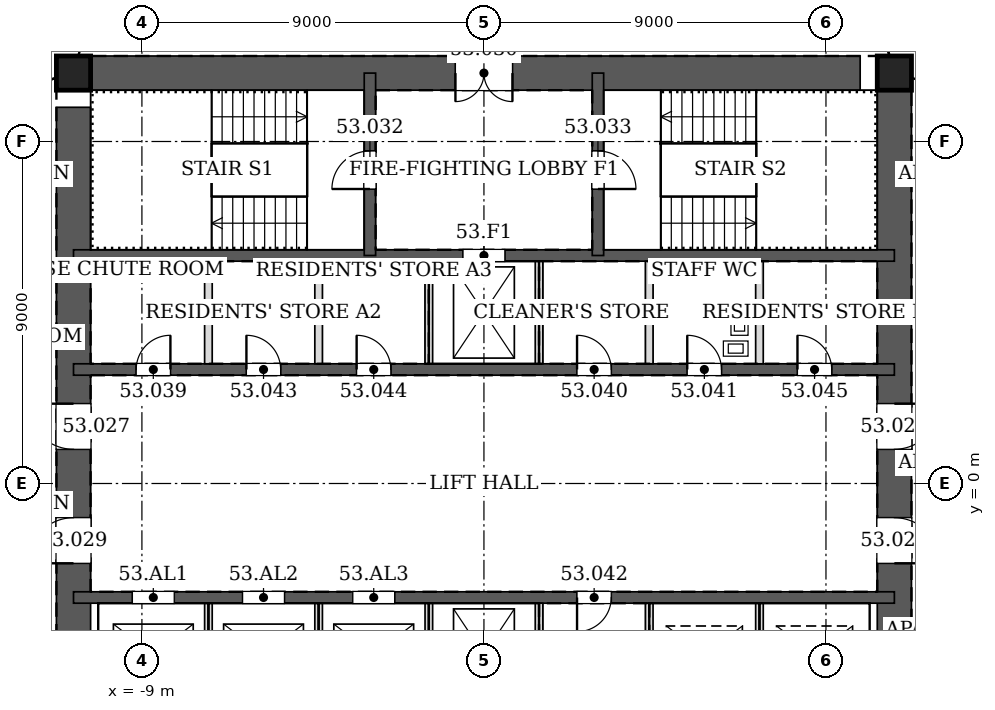
"""IFC4 building model, lengths in metres.
Left out: names, types, materials, properties, quantities, classifications, styles, units other than length and angle.
Written with IfcOpenShell. Run it as: python <this file> out.ifc"""

import sys

from ifc_helpers import new_model, si_unit, direction, frame, frame_2d, origin, origin_2d, place, context, subcontext, project, spatial, rectangle, hollow_rectangle, extrude, element, fill, save


model = new_model("IFC4")
c1 = context("Model", 3, precision=1e-05, world=origin(), true_north=direction((0.0, 1.0)))
c2 = subcontext(c1, "Body", "Model", "MODEL_VIEW")
j1 = project(units=[si_unit("LENGTHUNIT", "METRE"), si_unit("PLANEANGLEUNIT", "RADIAN")], contexts=[c1])
p1 = place(None, origin())
s1 = spatial("IfcSite", under=j1, at=p1, CompositionType="ELEMENT")
p2 = place(p1, origin())
s2 = spatial("IfcBuilding", under=s1, at=p2, CompositionType="ELEMENT")
p3 = place(p2, frame((0.0, 0.0, 227.8)))
s3 = spatial("IfcBuildingStorey", under=s2, at=p3, CompositionType="ELEMENT", Elevation=227.8)
for number, where, z_axis, x_axis in (
    (1, (10.8, 10.8, 0.0), (0.0, 0.0, 1.0), (1.0, 0.0, 0.0)),
    (2, (-10.8, 10.8, 0.0), (0.0, 0.0, 1.0), (1.0, 0.0, 0.0)),
):
    element("IfcColumn", number, at=place(p3, frame(where, z_axis=z_axis, x_axis=x_axis)), inside=s3, PredefinedType="COLUMN", context=c2, shape_type="SweptSolid", body=[
        extrude(hollow_rectangle(XDim=0.9, YDim=0.9, WallThickness=0.05, at=origin_2d()), origin(), (0.0, 0.0, 1.0), 3.4),
    ])
p4 = place(p3, frame((10.8, -10.8, 0.0), z_axis=(0.0, 0.0, 1.0), x_axis=(0.0, 1.0, 0.0)))
e3 = element("IfcWall", 3, at=p4, inside=s3, PredefinedType="SOLIDWALL", context=c2, shape_type="SweptSolid", body=[
    extrude(rectangle(XDim=21.6, YDim=0.9, at=frame_2d((10.8, 0.0))), origin(), (0.0, 0.0, 1.0), 3.4),
])
p5 = place(p4, frame((11.7, 0.0, 0.0)))
e4 = element("IfcOpeningElement", 4, at=p5, cuts=e3, PredefinedType="OPENING", context=c2, shape_type="SweptSolid", body=[
    extrude(rectangle(XDim=1.2, YDim=2.1, at=frame_2d((0.6, 1.05))), frame((0.0, 0.46, 0.0), z_axis=(0.0, -1.0, 0.0), x_axis=(1.0, 0.0, 0.0)), (0.0, 0.0, 1.0), 0.92),
])
p6 = place(p4, frame((8.7, 0.0, 0.0)))
e5 = element("IfcOpeningElement", 5, at=p6, cuts=e3, PredefinedType="OPENING", context=c2, shape_type="SweptSolid", body=[
    extrude(rectangle(XDim=1.2, YDim=2.1, at=frame_2d((0.6, 1.05))), frame((0.0, 0.46, 0.0), z_axis=(0.0, -1.0, 0.0), x_axis=(1.0, 0.0, 0.0)), (0.0, 0.0, 1.0), 0.92),
])
p7 = place(p3, frame((10.8, 10.8, 0.0), z_axis=(0.0, 0.0, 1.0), x_axis=(-1.0, 0.0, 0.0)))
e6 = element("IfcWall", 6, at=p7, inside=s3, PredefinedType="SOLIDWALL", context=c2, shape_type="SweptSolid", body=[
    extrude(rectangle(XDim=21.6, YDim=0.9, at=frame_2d((10.8, 0.0))), origin(), (0.0, 0.0, 1.0), 3.4),
])
p8 = place(p7, frame((10.05, 0.0, 0.0)))
e7 = element("IfcOpeningElement", 7, at=p8, cuts=e6, PredefinedType="OPENING", context=c2, shape_type="SweptSolid", body=[
    extrude(rectangle(XDim=1.5, YDim=2.1, at=frame_2d((0.75, 1.05))), frame((0.0, 0.46, 0.0), z_axis=(0.0, -1.0, 0.0), x_axis=(1.0, 0.0, 0.0)), (0.0, 0.0, 1.0), 0.92),
])
p9 = place(p3, frame((-10.8, 10.8, 0.0), z_axis=(0.0, 0.0, 1.0), x_axis=(0.0, -1.0, 0.0)))
e8 = element("IfcWall", 8, at=p9, inside=s3, PredefinedType="SOLIDWALL", context=c2, shape_type="SweptSolid", body=[
    extrude(rectangle(XDim=21.6, YDim=0.9, at=frame_2d((10.8, 0.0))), origin(), (0.0, 0.0, 1.0), 3.4),
])
p10 = place(p9, frame((8.7, 0.0, 0.0)))
e9 = element("IfcOpeningElement", 9, at=p10, cuts=e8, PredefinedType="OPENING", context=c2, shape_type="SweptSolid", body=[
    extrude(rectangle(XDim=1.2, YDim=2.1, at=frame_2d((0.6, 1.05))), frame((0.0, 0.46, 0.0), z_axis=(0.0, -1.0, 0.0), x_axis=(1.0, 0.0, 0.0)), (0.0, 0.0, 1.0), 0.92),
])
p11 = place(p9, frame((11.7, 0.0, 0.0)))
e10 = element("IfcOpeningElement", 10, at=p11, cuts=e8, PredefinedType="OPENING", context=c2, shape_type="SweptSolid", body=[
    extrude(rectangle(XDim=1.2, YDim=2.1, at=frame_2d((0.6, 1.05))), frame((0.0, 0.46, 0.0), z_axis=(0.0, -1.0, 0.0), x_axis=(1.0, 0.0, 0.0)), (0.0, 0.0, 1.0), 0.92),
])
p12 = place(p3, frame((-10.8, 3.0, 0.0), z_axis=(0.0, 0.0, 1.0), x_axis=(1.0, 0.0, 0.0)))
e11 = element("IfcWall", 11, at=p12, inside=s3, PredefinedType="SOLIDWALL", context=c2, shape_type="SweptSolid", body=[
    extrude(rectangle(XDim=21.6, YDim=0.3, at=frame_2d((10.8, 0.0))), origin(), (0.0, 0.0, 1.0), 3.4),
])
p13 = place(p12, frame((1.65, 0.0, 0.0)))
e12 = element("IfcOpeningElement", 12, at=p13, cuts=e11, PredefinedType="OPENING", context=c2, shape_type="SweptSolid", body=[
    extrude(rectangle(XDim=0.9, YDim=2.1, at=frame_2d((0.45, 1.05))), frame((0.0, 0.16, 0.0), z_axis=(0.0, -1.0, 0.0), x_axis=(1.0, 0.0, 0.0)), (0.0, 0.0, 1.0), 0.32),
])
p14 = place(p12, frame((13.25, 0.0, 0.0)))
e13 = element("IfcOpeningElement", 13, at=p14, cuts=e11, PredefinedType="OPENING", context=c2, shape_type="SweptSolid", body=[
    extrude(rectangle(XDim=0.9, YDim=2.1, at=frame_2d((0.45, 1.05))), frame((0.0, 0.16, 0.0), z_axis=(0.0, -1.0, 0.0), x_axis=(1.0, 0.0, 0.0)), (0.0, 0.0, 1.0), 0.32),
])
p15 = place(p12, frame((16.15, 0.0, 0.0)))
e14 = element("IfcOpeningElement", 14, at=p15, cuts=e11, PredefinedType="OPENING", context=c2, shape_type="SweptSolid", body=[
    extrude(rectangle(XDim=0.9, YDim=2.1, at=frame_2d((0.45, 1.05))), frame((0.0, 0.16, 0.0), z_axis=(0.0, -1.0, 0.0), x_axis=(1.0, 0.0, 0.0)), (0.0, 0.0, 1.0), 0.32),
])
p16 = place(p12, frame((4.55, 0.0, 0.0)))
e15 = element("IfcOpeningElement", 15, at=p16, cuts=e11, PredefinedType="OPENING", context=c2, shape_type="SweptSolid", body=[
    extrude(rectangle(XDim=0.9, YDim=2.1, at=frame_2d((0.45, 1.05))), frame((0.0, 0.16, 0.0), z_axis=(0.0, -1.0, 0.0), x_axis=(1.0, 0.0, 0.0)), (0.0, 0.0, 1.0), 0.32),
])
p17 = place(p12, frame((7.45, 0.0, 0.0)))
e16 = element("IfcOpeningElement", 16, at=p17, cuts=e11, PredefinedType="OPENING", context=c2, shape_type="SweptSolid", body=[
    extrude(rectangle(XDim=0.9, YDim=2.1, at=frame_2d((0.45, 1.05))), frame((0.0, 0.16, 0.0), z_axis=(0.0, -1.0, 0.0), x_axis=(1.0, 0.0, 0.0)), (0.0, 0.0, 1.0), 0.32),
])
p18 = place(p12, frame((19.05, 0.0, 0.0)))
e17 = element("IfcOpeningElement", 17, at=p18, cuts=e11, PredefinedType="OPENING", context=c2, shape_type="SweptSolid", body=[
    extrude(rectangle(XDim=0.9, YDim=2.1, at=frame_2d((0.45, 1.05))), frame((0.0, 0.16, 0.0), z_axis=(0.0, -1.0, 0.0), x_axis=(1.0, 0.0, 0.0)), (0.0, 0.0, 1.0), 0.32),
])
p19 = place(p3, frame((-10.8, 6.0, 0.0), z_axis=(0.0, 0.0, 1.0), x_axis=(1.0, 0.0, 0.0)))
e18 = element("IfcWall", 18, at=p19, inside=s3, PredefinedType="SOLIDWALL", context=c2, shape_type="SweptSolid", body=[
    extrude(rectangle(XDim=21.6, YDim=0.3, at=frame_2d((10.8, 0.0))), origin(), (0.0, 0.0, 1.0), 3.4),
])
p20 = place(p19, frame((10.25, 0.0, 0.0)))
e19 = element("IfcOpeningElement", 19, at=p20, cuts=e18, PredefinedType="OPENING", context=c2, shape_type="SweptSolid", body=[
    extrude(rectangle(XDim=1.1, YDim=2.1, at=frame_2d((0.55, 1.05))), frame((0.0, 0.16, 0.0), z_axis=(0.0, -1.0, 0.0), x_axis=(1.0, 0.0, 0.0)), (0.0, 0.0, 1.0), 0.32),
])
p21 = place(p3, frame((-3.0, 6.0, 0.0), z_axis=(0.0, 0.0, 1.0), x_axis=(0.0, 1.0, 0.0)))
e20 = element("IfcWall", 20, at=p21, inside=s3, PredefinedType="SOLIDWALL", context=c2, shape_type="SweptSolid", body=[
    extrude(rectangle(XDim=4.8, YDim=0.3, at=frame_2d((2.4, 0.0))), origin(), (0.0, 0.0, 1.0), 3.4),
])
p22 = place(p21, frame((1.75, 0.0, 0.0)))
e21 = element("IfcOpeningElement", 21, at=p22, cuts=e20, PredefinedType="OPENING", context=c2, shape_type="SweptSolid", body=[
    extrude(rectangle(XDim=1.0, YDim=2.1, at=frame_2d((0.5, 1.05))), frame((0.0, 0.16, 0.0), z_axis=(0.0, -1.0, 0.0), x_axis=(1.0, 0.0, 0.0)), (0.0, 0.0, 1.0), 0.32),
])
p23 = place(p3, frame((3.0, 6.0, 0.0), z_axis=(0.0, 0.0, 1.0), x_axis=(0.0, 1.0, 0.0)))
e22 = element("IfcWall", 22, at=p23, inside=s3, PredefinedType="SOLIDWALL", context=c2, shape_type="SweptSolid", body=[
    extrude(rectangle(XDim=4.8, YDim=0.3, at=frame_2d((2.4, 0.0))), origin(), (0.0, 0.0, 1.0), 3.4),
])
p24 = place(p23, frame((1.75, 0.0, 0.0)))
e23 = element("IfcOpeningElement", 23, at=p24, cuts=e22, PredefinedType="OPENING", context=c2, shape_type="SweptSolid", body=[
    extrude(rectangle(XDim=1.0, YDim=2.1, at=frame_2d((0.5, 1.05))), frame((0.0, 0.16, 0.0), z_axis=(0.0, -1.0, 0.0), x_axis=(1.0, 0.0, 0.0)), (0.0, 0.0, 1.0), 0.32),
])
p25 = place(p3, frame((-10.8, -3.0, 0.0), z_axis=(0.0, 0.0, 1.0), x_axis=(1.0, 0.0, 0.0)))
e24 = element("IfcWall", 24, at=p25, inside=s3, PredefinedType="SOLIDWALL", context=c2, shape_type="SweptSolid", body=[
    extrude(rectangle(XDim=21.6, YDim=0.3, at=frame_2d((10.8, 0.0))), origin(), (0.0, 0.0, 1.0), 3.4),
])
p26 = place(p25, frame((13.25, 0.0, 0.0)))
e25 = element("IfcOpeningElement", 25, at=p26, cuts=e24, PredefinedType="OPENING", context=c2, shape_type="SweptSolid", body=[
    extrude(rectangle(XDim=0.9, YDim=2.1, at=frame_2d((0.45, 1.05))), frame((0.0, 0.16, 0.0), z_axis=(0.0, -1.0, 0.0), x_axis=(1.0, 0.0, 0.0)), (0.0, 0.0, 1.0), 0.32),
])
p27 = place(p25, frame((1.55, 0.0, 0.0)))
e26 = element("IfcOpeningElement", 26, at=p27, cuts=e24, PredefinedType="OPENING", context=c2, shape_type="SweptSolid", body=[
    extrude(rectangle(XDim=1.1, YDim=2.1, at=frame_2d((0.55, 1.05))), frame((0.0, 0.16, 0.0), z_axis=(0.0, -1.0, 0.0), x_axis=(1.0, 0.0, 0.0)), (0.0, 0.0, 1.0), 0.32),
])
p28 = place(p25, frame((4.45, 0.0, 0.0)))
e27 = element("IfcOpeningElement", 27, at=p28, cuts=e24, PredefinedType="OPENING", context=c2, shape_type="SweptSolid", body=[
    extrude(rectangle(XDim=1.1, YDim=2.1, at=frame_2d((0.55, 1.05))), frame((0.0, 0.16, 0.0), z_axis=(0.0, -1.0, 0.0), x_axis=(1.0, 0.0, 0.0)), (0.0, 0.0, 1.0), 0.32),
])
p29 = place(p25, frame((7.35, 0.0, 0.0)))
e28 = element("IfcOpeningElement", 28, at=p29, cuts=e24, PredefinedType="OPENING", context=c2, shape_type="SweptSolid", body=[
    extrude(rectangle(XDim=1.1, YDim=2.1, at=frame_2d((0.55, 1.05))), frame((0.0, 0.16, 0.0), z_axis=(0.0, -1.0, 0.0), x_axis=(1.0, 0.0, 0.0)), (0.0, 0.0, 1.0), 0.32),
])
for number, where, z_axis, x_axis in (
    (29, (-7.25, 3.15, 0.0), (0.0, 0.0, 1.0), (0.0, 1.0, 0.0)),
    (30, (-4.35, 3.15, 0.0), (0.0, 0.0, 1.0), (0.0, 1.0, 0.0)),
    (31, (-1.45, 3.15, 0.0), (0.0, 0.0, 1.0), (0.0, 1.0, 0.0)),
    (32, (1.45, 3.15, 0.0), (0.0, 0.0, 1.0), (0.0, 1.0, 0.0)),
    (33, (4.35, 3.15, 0.0), (0.0, 0.0, 1.0), (0.0, 1.0, 0.0)),
    (34, (7.25, 3.15, 0.0), (0.0, 0.0, 1.0), (0.0, 1.0, 0.0)),
):
    element("IfcWall", number, at=place(p3, frame(where, z_axis=z_axis, x_axis=x_axis)), inside=s3, PredefinedType="PARTITIONING", context=c2, shape_type="SweptSolid", body=[
        extrude(rectangle(XDim=2.7, YDim=0.2, at=frame_2d((1.35, 0.0))), origin(), (0.0, 0.0, 1.0), 3.2),
    ])
for number, where, z_axis, x_axis in (
    (35, (-7.25, -5.85, 0.0), (0.0, 0.0, 1.0), (0.0, 1.0, 0.0)),
    (36, (-4.35, -5.85, 0.0), (0.0, 0.0, 1.0), (0.0, 1.0, 0.0)),
    (37, (-1.45, -5.85, 0.0), (0.0, 0.0, 1.0), (0.0, 1.0, 0.0)),
):
    element("IfcWall", number, at=place(p3, frame(where, z_axis=z_axis, x_axis=x_axis)), inside=s3, PredefinedType="PARTITIONING", context=c2, shape_type="SweptSolid", body=[
        extrude(rectangle(XDim=2.7, YDim=0.2, at=frame_2d((1.35, 0.0))), origin(), (0.0, 0.0, 1.0), 3.4),
    ])
for number, where, z_axis, x_axis in (
    (38, (1.45, -5.85, 0.0), (0.0, 0.0, 1.0), (0.0, 1.0, 0.0)),
    (39, (4.35, -5.85, 0.0), (0.0, 0.0, 1.0), (0.0, 1.0, 0.0)),
):
    element("IfcWall", number, at=place(p3, frame(where, z_axis=z_axis, x_axis=x_axis)), inside=s3, PredefinedType="PARTITIONING", context=c2, shape_type="SweptSolid", body=[
        extrude(rectangle(XDim=2.7, YDim=0.2, at=frame_2d((1.35, 0.0))), origin(), (0.0, 0.0, 1.0), 3.2),
    ])
p30 = place(p3, frame((7.25, -5.85, 0.0), z_axis=(0.0, 0.0, 1.0), x_axis=(0.0, 1.0, 0.0)))
e40 = element("IfcWall", 40, at=p30, inside=s3, PredefinedType="PARTITIONING", context=c2, shape_type="SweptSolid", body=[
    extrude(rectangle(XDim=2.7, YDim=0.2, at=frame_2d((1.35, 0.0))), origin(), (0.0, 0.0, 1.0), 3.4),
])
p31 = place(p5, frame((1.2, 0.0, 0.0), z_axis=(0.0, 0.0, 1.0), x_axis=(-1.0, 0.0, 0.0)))
e41 = element("IfcDoor", 41, at=p31, inside=s3, OperationType="SINGLE_SWING_LEFT", PredefinedType="DOOR", context=c2, shape_type="SweptSolid", body=[
    extrude(rectangle(XDim=1.2, YDim=2.1, at=frame_2d((0.6, 1.05))), frame((0.0, 0.025, 0.0), z_axis=(0.0, -1.0, 0.0), x_axis=(1.0, 0.0, 0.0)), (0.0, 0.0, 1.0), 0.05),
])
fill(e4, e41)
p32 = place(p10, frame((1.2, 0.0, 0.0), z_axis=(0.0, 0.0, 1.0), x_axis=(-1.0, 0.0, 0.0)))
e42 = element("IfcDoor", 42, at=p32, inside=s3, OperationType="SINGLE_SWING_RIGHT", PredefinedType="DOOR", context=c2, shape_type="SweptSolid", body=[
    extrude(rectangle(XDim=1.2, YDim=2.1, at=frame_2d((0.6, 1.05))), frame((0.0, 0.025, 0.0), z_axis=(0.0, -1.0, 0.0), x_axis=(1.0, 0.0, 0.0)), (0.0, 0.0, 1.0), 0.05),
])
fill(e9, e42)
p33 = place(p6, frame((1.2, 0.0, 0.0), z_axis=(0.0, 0.0, 1.0), x_axis=(-1.0, 0.0, 0.0)))
e43 = element("IfcDoor", 43, at=p33, inside=s3, OperationType="SINGLE_SWING_RIGHT", PredefinedType="DOOR", context=c2, shape_type="SweptSolid", body=[
    extrude(rectangle(XDim=1.2, YDim=2.1, at=frame_2d((0.6, 1.05))), frame((0.0, 0.025, 0.0), z_axis=(0.0, -1.0, 0.0), x_axis=(1.0, 0.0, 0.0)), (0.0, 0.0, 1.0), 0.05),
])
fill(e5, e43)
p34 = place(p11, frame((1.2, 0.0, 0.0), z_axis=(0.0, 0.0, 1.0), x_axis=(-1.0, 0.0, 0.0)))
e44 = element("IfcDoor", 44, at=p34, inside=s3, OperationType="SINGLE_SWING_LEFT", PredefinedType="DOOR", context=c2, shape_type="SweptSolid", body=[
    extrude(rectangle(XDim=1.2, YDim=2.1, at=frame_2d((0.6, 1.05))), frame((0.0, 0.025, 0.0), z_axis=(0.0, -1.0, 0.0), x_axis=(1.0, 0.0, 0.0)), (0.0, 0.0, 1.0), 0.05),
])
fill(e10, e44)
p35 = place(p8, origin())
e45 = element("IfcDoor", 45, at=p35, inside=s3, OperationType="DOUBLE_DOOR_SINGLE_SWING", PredefinedType="DOOR", context=c2, shape_type="SweptSolid", body=[
    extrude(rectangle(XDim=1.5, YDim=2.1, at=frame_2d((0.75, 1.05))), frame((0.0, 0.025, 0.0), z_axis=(0.0, -1.0, 0.0), x_axis=(1.0, 0.0, 0.0)), (0.0, 0.0, 1.0), 0.05),
])
fill(e7, e45)
p36 = place(p22, origin())
e46 = element("IfcDoor", 46, at=p36, inside=s3, OperationType="SINGLE_SWING_LEFT", PredefinedType="DOOR", context=c2, shape_type="SweptSolid", body=[
    extrude(rectangle(XDim=1.0, YDim=2.1, at=frame_2d((0.5, 1.05))), frame((0.0, 0.025, 0.0), z_axis=(0.0, -1.0, 0.0), x_axis=(1.0, 0.0, 0.0)), (0.0, 0.0, 1.0), 0.05),
])
fill(e21, e46)
p37 = place(p24, frame((1.0, 0.0, 0.0), z_axis=(0.0, 0.0, 1.0), x_axis=(-1.0, 0.0, 0.0)))
e47 = element("IfcDoor", 47, at=p37, inside=s3, OperationType="SINGLE_SWING_RIGHT", PredefinedType="DOOR", context=c2, shape_type="SweptSolid", body=[
    extrude(rectangle(XDim=1.0, YDim=2.1, at=frame_2d((0.5, 1.05))), frame((0.0, 0.025, 0.0), z_axis=(0.0, -1.0, 0.0), x_axis=(1.0, 0.0, 0.0)), (0.0, 0.0, 1.0), 0.05),
])
fill(e23, e47)
p38 = place(p13, origin())
e48 = element("IfcDoor", 48, at=p38, inside=s3, OperationType="SINGLE_SWING_RIGHT", PredefinedType="DOOR", context=c2, shape_type="SweptSolid", body=[
    extrude(rectangle(XDim=0.9, YDim=2.1, at=frame_2d((0.45, 1.05))), frame((0.0, 0.025, 0.0), z_axis=(0.0, -1.0, 0.0), x_axis=(1.0, 0.0, 0.0)), (0.0, 0.0, 1.0), 0.05),
])
fill(e12, e48)
p39 = place(p14, origin())
e49 = element("IfcDoor", 49, at=p39, inside=s3, OperationType="SINGLE_SWING_LEFT", PredefinedType="DOOR", context=c2, shape_type="SweptSolid", body=[
    extrude(rectangle(XDim=0.9, YDim=2.1, at=frame_2d((0.45, 1.05))), frame((0.0, 0.025, 0.0), z_axis=(0.0, -1.0, 0.0), x_axis=(1.0, 0.0, 0.0)), (0.0, 0.0, 1.0), 0.05),
])
fill(e13, e49)
p40 = place(p15, origin())
e50 = element("IfcDoor", 50, at=p40, inside=s3, OperationType="SINGLE_SWING_LEFT", PredefinedType="DOOR", context=c2, shape_type="SweptSolid", body=[
    extrude(rectangle(XDim=0.9, YDim=2.1, at=frame_2d((0.45, 1.05))), frame((0.0, 0.025, 0.0), z_axis=(0.0, -1.0, 0.0), x_axis=(1.0, 0.0, 0.0)), (0.0, 0.0, 1.0), 0.05),
])
fill(e14, e50)
p41 = place(p26, frame((0.9, 0.0, 0.0), z_axis=(0.0, 0.0, 1.0), x_axis=(-1.0, 0.0, 0.0)))
e51 = element("IfcDoor", 51, at=p41, inside=s3, OperationType="SINGLE_SWING_RIGHT", PredefinedType="DOOR", context=c2, shape_type="SweptSolid", body=[
    extrude(rectangle(XDim=0.9, YDim=2.1, at=frame_2d((0.45, 1.05))), frame((0.0, 0.025, 0.0), z_axis=(0.0, -1.0, 0.0), x_axis=(1.0, 0.0, 0.0)), (0.0, 0.0, 1.0), 0.05),
])
fill(e25, e51)
p42 = place(p16, origin())
e52 = element("IfcDoor", 52, at=p42, inside=s3, OperationType="SINGLE_SWING_LEFT", PredefinedType="DOOR", context=c2, shape_type="SweptSolid", body=[
    extrude(rectangle(XDim=0.9, YDim=2.1, at=frame_2d((0.45, 1.05))), frame((0.0, 0.025, 0.0), z_axis=(0.0, -1.0, 0.0), x_axis=(1.0, 0.0, 0.0)), (0.0, 0.0, 1.0), 0.05),
])
fill(e15, e52)
p43 = place(p17, origin())
e53 = element("IfcDoor", 53, at=p43, inside=s3, OperationType="SINGLE_SWING_LEFT", PredefinedType="DOOR", context=c2, shape_type="SweptSolid", body=[
    extrude(rectangle(XDim=0.9, YDim=2.1, at=frame_2d((0.45, 1.05))), frame((0.0, 0.025, 0.0), z_axis=(0.0, -1.0, 0.0), x_axis=(1.0, 0.0, 0.0)), (0.0, 0.0, 1.0), 0.05),
])
fill(e16, e53)
p44 = place(p18, origin())
e54 = element("IfcDoor", 54, at=p44, inside=s3, OperationType="SINGLE_SWING_LEFT", PredefinedType="DOOR", context=c2, shape_type="SweptSolid", body=[
    extrude(rectangle(XDim=0.9, YDim=2.1, at=frame_2d((0.45, 1.05))), frame((0.0, 0.025, 0.0), z_axis=(0.0, -1.0, 0.0), x_axis=(1.0, 0.0, 0.0)), (0.0, 0.0, 1.0), 0.05),
])
fill(e17, e54)
p45 = place(p20, origin())
e55 = element("IfcDoor", 55, at=p45, inside=s3, OperationType="DOUBLE_DOOR_SLIDING", PredefinedType="DOOR", context=c2, shape_type="SweptSolid", body=[
    extrude(rectangle(XDim=1.1, YDim=2.1, at=frame_2d((0.55, 1.05))), frame((0.0, 0.025, 0.0), z_axis=(0.0, -1.0, 0.0), x_axis=(1.0, 0.0, 0.0)), (0.0, 0.0, 1.0), 0.05),
])
fill(e19, e55)
p46 = place(p27, origin())
e56 = element("IfcDoor", 56, at=p46, inside=s3, OperationType="DOUBLE_DOOR_SLIDING", PredefinedType="DOOR", context=c2, shape_type="SweptSolid", body=[
    extrude(rectangle(XDim=1.1, YDim=2.1, at=frame_2d((0.55, 1.05))), frame((0.0, 0.025, 0.0), z_axis=(0.0, -1.0, 0.0), x_axis=(1.0, 0.0, 0.0)), (0.0, 0.0, 1.0), 0.05),
])
fill(e26, e56)
p47 = place(p28, origin())
e57 = element("IfcDoor", 57, at=p47, inside=s3, OperationType="DOUBLE_DOOR_SLIDING", PredefinedType="DOOR", context=c2, shape_type="SweptSolid", body=[
    extrude(rectangle(XDim=1.1, YDim=2.1, at=frame_2d((0.55, 1.05))), frame((0.0, 0.025, 0.0), z_axis=(0.0, -1.0, 0.0), x_axis=(1.0, 0.0, 0.0)), (0.0, 0.0, 1.0), 0.05),
])
fill(e27, e57)
p48 = place(p29, origin())
e58 = element("IfcDoor", 58, at=p48, inside=s3, OperationType="DOUBLE_DOOR_SLIDING", PredefinedType="DOOR", context=c2, shape_type="SweptSolid", body=[
    extrude(rectangle(XDim=1.1, YDim=2.1, at=frame_2d((0.55, 1.05))), frame((0.0, 0.025, 0.0), z_axis=(0.0, -1.0, 0.0), x_axis=(1.0, 0.0, 0.0)), (0.0, 0.0, 1.0), 0.05),
])
fill(e28, e58)
save(model, sys.argv[1])
